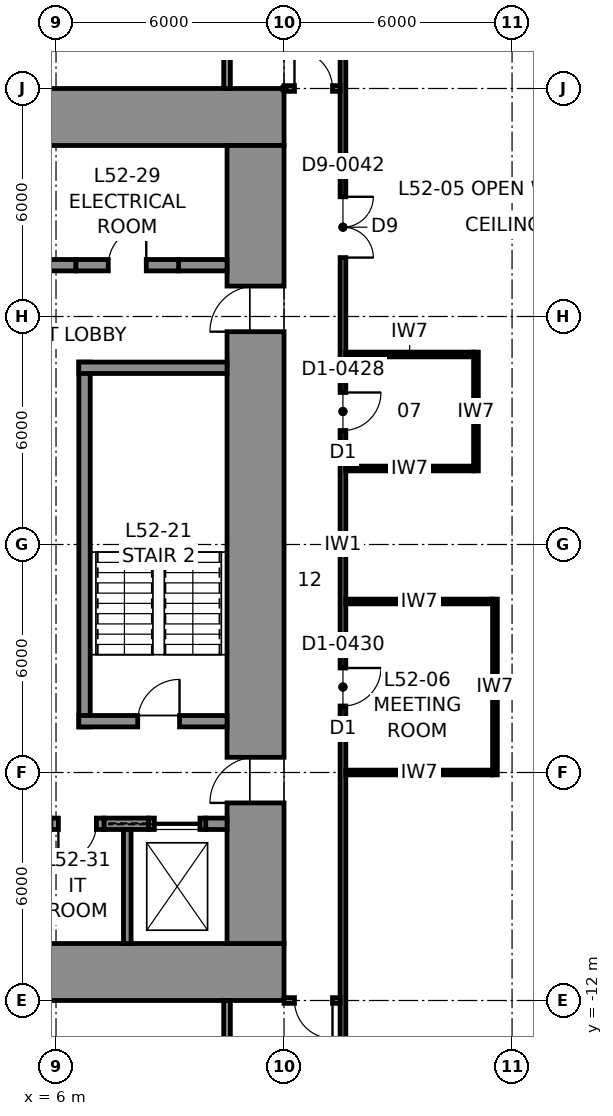
"""IFC4 building model, lengths in metres.
Left out: names, types, materials, properties, quantities, classifications, styles, units other than length and angle.
Written with IfcOpenShell. Run it as: python <this file> out.ifc"""

import sys

from ifc_helpers import new_model, si_unit, direction, frame, frame_2d, origin, place, context, subcontext, project, spatial, rectangle, extrude, element, fill, save


model = new_model("IFC4")
c1 = context("Model", 3, precision=1e-05, world=origin(), true_north=direction((0.0, 1.0)))
c2 = subcontext(c1, "Body", "Model", "MODEL_VIEW")
j1 = project(units=[si_unit("LENGTHUNIT", "METRE"), si_unit("PLANEANGLEUNIT", "RADIAN")], contexts=[c1])
p1 = place(None, origin())
s1 = spatial("IfcSite", under=j1, at=p1, CompositionType="ELEMENT")
p2 = place(p1, origin())
s2 = spatial("IfcBuilding", under=s1, at=p2, CompositionType="ELEMENT")
p3 = place(p2, frame((0.0, 0.0, 237.8)))
s3 = spatial("IfcBuildingStorey", under=s2, at=p3, CompositionType="ELEMENT", Elevation=237.8)
for number, where, z_axis, x_axis in (
    (1, (-12.0, 11.25, 0.0), (0.0, 0.0, 1.0), (1.0, 0.0, 0.0)),
    (2, (12.0, -11.25, 0.0), (0.0, 0.0, 1.0), (-1.0, 0.0, 0.0)),
):
    element("IfcWall", number, at=place(p3, frame(where, z_axis=z_axis, x_axis=x_axis)), inside=s3, PredefinedType="SHEAR", context=c2, shape_type="SweptSolid", body=[
        extrude(rectangle(XDim=24.0, YDim=1.5, at=frame_2d((12.0, 0.0))), origin(), (0.0, 0.0, 1.0), 4.0),
    ])
p4 = place(p3, frame((11.25, 10.5, 0.0), z_axis=(0.0, 0.0, 1.0), x_axis=(0.0, -1.0, 0.0)))
e3 = element("IfcWall", 3, at=p4, inside=s3, PredefinedType="SHEAR", context=c2, shape_type="SweptSolid", body=[
    extrude(rectangle(XDim=21.0, YDim=1.5, at=frame_2d((10.5, 0.0))), origin(), (0.0, 0.0, 1.0), 4.0),
])
p5 = place(p4, frame((3.7, 0.0, 0.0)))
e4 = element("IfcOpeningElement", 4, at=p5, cuts=e3, PredefinedType="OPENING", context=c2, shape_type="SweptSolid", body=[
    extrude(rectangle(XDim=1.2, YDim=2.3, at=frame_2d((0.6, 1.15))), frame((0.0, 0.76, 0.0), z_axis=(0.0, -1.0, 0.0), x_axis=(1.0, 0.0, 0.0)), (0.0, 0.0, 1.0), 1.52),
])
p6 = place(p4, frame((16.1, 0.0, 0.0)))
e5 = element("IfcOpeningElement", 5, at=p6, cuts=e3, PredefinedType="OPENING", context=c2, shape_type="SweptSolid", body=[
    extrude(rectangle(XDim=1.2, YDim=2.3, at=frame_2d((0.6, 1.15))), frame((0.0, 0.76, 0.0), z_axis=(0.0, -1.0, 0.0), x_axis=(1.0, 0.0, 0.0)), (0.0, 0.0, 1.0), 1.52),
])
p7 = place(p3, frame((4.637, 7.35, 0.0), z_axis=(0.0, 0.0, 1.0), x_axis=(1.0, 0.0, 0.0)))
e6 = element("IfcWall", 6, at=p7, inside=s3, PredefinedType="SHEAR", context=c2, shape_type="SweptSolid", body=[
    extrude(rectangle(XDim=1.887, YDim=0.3, at=frame_2d((0.944, 0.0))), origin(), (0.0, 0.0, 1.0), 4.0),
])
p8 = place(p3, frame((9.225, 7.35, 0.0), z_axis=(0.0, 0.0, 1.0), x_axis=(1.0, 0.0, 0.0)))
e7 = element("IfcWall", 7, at=p8, inside=s3, PredefinedType="SHEAR", context=c2, shape_type="SweptSolid", body=[
    extrude(rectangle(XDim=1.275, YDim=0.3, at=frame_2d((0.637, 0.0))), origin(), (0.0, 0.0, 1.0), 4.0),
])
p9 = place(p3, frame((6.525, 7.35, 0.0), z_axis=(0.0, 0.0, 1.0), x_axis=(1.0, 0.0, 0.0)))
e8 = element("IfcWall", 8, at=p9, inside=s3, PredefinedType="PARTITIONING", context=c2, shape_type="SweptSolid", body=[
    extrude(rectangle(XDim=2.7, YDim=0.3, at=frame_2d((1.35, 0.0))), origin(), (0.0, 0.0, 1.0), 4.0),
])
p10 = place(p9, frame((0.85, 0.0, 0.0)))
e9 = element("IfcOpeningElement", 9, at=p10, cuts=e8, PredefinedType="OPENING", context=c2, shape_type="SweptSolid", body=[
    extrude(rectangle(XDim=1.0, YDim=2.3, at=frame_2d((0.5, 1.15))), frame((0.0, 0.16, 0.0), z_axis=(0.0, -1.0, 0.0), x_axis=(1.0, 0.0, 0.0)), (0.0, 0.0, 1.0), 0.32),
])
p11 = place(p3, frame((7.262, -7.35, 0.0), z_axis=(0.0, 0.0, 1.0), x_axis=(1.0, 0.0, 0.0)))
e10 = element("IfcWall", 10, at=p11, inside=s3, PredefinedType="SHEAR", context=c2, shape_type="SweptSolid", body=[
    extrude(rectangle(XDim=1.175, YDim=0.3, at=frame_2d((0.587, 0.0))), origin(), (0.0, 0.0, 1.0), 4.0),
])
p12 = place(p3, frame((9.938, -7.35, 0.0), z_axis=(0.0, 0.0, 1.0), x_axis=(1.0, 0.0, 0.0)))
e11 = element("IfcWall", 11, at=p12, inside=s3, PredefinedType="SHEAR", context=c2, shape_type="SweptSolid", body=[
    extrude(rectangle(XDim=0.562, YDim=0.3, at=frame_2d((0.281, 0.0))), origin(), (0.0, 0.0, 1.0), 4.0),
])
p13 = place(p3, frame((5.863, -7.35, 0.0), z_axis=(0.0, 0.0, 1.0), x_axis=(1.0, 0.0, 0.0)))
e12 = element("IfcWall", 12, at=p13, inside=s3, PredefinedType="PARTITIONING", context=c2, shape_type="SweptSolid", body=[
    extrude(rectangle(XDim=1.4, YDim=0.3, at=frame_2d((0.7, 0.0))), origin(), (0.0, 0.0, 1.0), 4.0),
])
p14 = place(p13, frame((0.2, 0.0, 0.0)))
e13 = element("IfcOpeningElement", 13, at=p14, cuts=e12, PredefinedType="OPENING", context=c2, shape_type="SweptSolid", body=[
    extrude(rectangle(XDim=1.0, YDim=2.3, at=frame_2d((0.5, 1.15))), frame((0.0, 0.16, 0.0), z_axis=(0.0, -1.0, 0.0), x_axis=(1.0, 0.0, 0.0)), (0.0, 0.0, 1.0), 0.32),
])
p15 = place(p3, frame((8.438, -7.35, 0.0), z_axis=(0.0, 0.0, 1.0), x_axis=(1.0, 0.0, 0.0)))
e14 = element("IfcWall", 14, at=p15, inside=s3, PredefinedType="PARTITIONING", context=c2, shape_type="SweptSolid", body=[
    extrude(rectangle(XDim=1.5, YDim=0.3, at=frame_2d((0.75, 0.0))), origin(), (0.0, 0.0, 1.0), 4.0),
])
p16 = place(p15, frame((0.15, 0.0, 0.0)))
e15 = element("IfcOpeningElement", 15, at=p16, cuts=e14, PredefinedType="OPENING", context=c2, shape_type="SweptSolid", body=[
    extrude(rectangle(XDim=1.2, YDim=2.3, at=frame_2d((0.6, 1.15))), frame((0.0, 0.16, 0.0), z_axis=(0.0, -1.0, 0.0), x_axis=(1.0, 0.0, 0.0)), (0.0, 0.0, 1.0), 0.32),
])
p17 = place(p3, frame((7.875, -10.5, 0.0), z_axis=(0.0, 0.0, 1.0), x_axis=(0.0, 1.0, 0.0)))
e16 = element("IfcWall", 16, at=p17, inside=s3, PredefinedType="PARTITIONING", context=c2, shape_type="SweptSolid", body=[
    extrude(rectangle(XDim=3.0, YDim=0.2, at=frame_2d((1.5, 0.0))), origin(), (0.0, 0.0, 1.0), 4.0),
])
p18 = place(p3, frame((13.55, -13.575, 0.0), z_axis=(0.0, 0.0, 1.0), x_axis=(0.0, 1.0, 0.0)))
e17 = element("IfcWall", 17, at=p18, inside=s3, PredefinedType="PARTITIONING", context=c2, shape_type="SweptSolid", body=[
    extrude(rectangle(XDim=27.15, YDim=0.15, at=frame_2d((13.575, 0.0))), origin(), (0.0, 0.0, 1.0), 3.83),
])
p19 = place(p18, frame((21.125, 0.0, 0.0)))
e18 = element("IfcOpeningElement", 18, at=p19, cuts=e17, PredefinedType="OPENING", context=c2, shape_type="SweptSolid", body=[
    extrude(rectangle(XDim=1.6, YDim=2.3, at=frame_2d((0.8, 1.15))), frame((0.0, 0.085, 0.0), z_axis=(0.0, -1.0, 0.0), x_axis=(1.0, 0.0, 0.0)), (0.0, 0.0, 1.0), 0.17),
])
p20 = place(p18, frame((9.325, 0.0, 0.0)))
e19 = element("IfcOpeningElement", 19, at=p20, cuts=e17, PredefinedType="OPENING", context=c2, shape_type="SweptSolid", body=[
    extrude(rectangle(XDim=1.0, YDim=2.3, at=frame_2d((0.5, 1.15))), frame((0.0, 0.085, 0.0), z_axis=(0.0, -1.0, 0.0), x_axis=(1.0, 0.0, 0.0)), (0.0, 0.0, 1.0), 0.17),
])
p21 = place(p18, frame((16.575, 0.0, 0.0)))
e20 = element("IfcOpeningElement", 20, at=p21, cuts=e17, PredefinedType="OPENING", context=c2, shape_type="SweptSolid", body=[
    extrude(rectangle(XDim=1.0, YDim=2.3, at=frame_2d((0.5, 1.15))), frame((0.0, 0.085, 0.0), z_axis=(0.0, -1.0, 0.0), x_axis=(1.0, 0.0, 0.0)), (0.0, 0.0, 1.0), 0.17),
])
p22 = place(p3, frame((12.0, 12.0, 0.0), z_axis=(0.0, 0.0, 1.0), x_axis=(1.0, 0.0, 0.0)))
e21 = element("IfcWall", 21, at=p22, inside=s3, PredefinedType="PARTITIONING", context=c2, shape_type="SweptSolid", body=[
    extrude(rectangle(XDim=1.475, YDim=0.15, at=frame_2d((0.738, 0.0))), origin(), (0.0, 0.0, 1.0), 3.83),
])
p23 = place(p22, frame((0.275, 0.0, 0.0)))
e22 = element("IfcOpeningElement", 22, at=p23, cuts=e21, PredefinedType="OPENING", context=c2, shape_type="SweptSolid", body=[
    extrude(rectangle(XDim=1.0, YDim=2.3, at=frame_2d((0.5, 1.15))), frame((0.0, 0.085, 0.0), z_axis=(0.0, -1.0, 0.0), x_axis=(1.0, 0.0, 0.0)), (0.0, 0.0, 1.0), 0.17),
])
p24 = place(p3, frame((13.475, -12.0, 0.0), z_axis=(0.0, 0.0, 1.0), x_axis=(-1.0, 0.0, 0.0)))
e23 = element("IfcWall", 23, at=p24, inside=s3, PredefinedType="PARTITIONING", context=c2, shape_type="SweptSolid", body=[
    extrude(rectangle(XDim=1.475, YDim=0.15, at=frame_2d((0.738, 0.0))), origin(), (0.0, 0.0, 1.0), 3.83),
])
p25 = place(p24, frame((0.2, 0.0, 0.0)))
e24 = element("IfcOpeningElement", 24, at=p25, cuts=e23, PredefinedType="OPENING", context=c2, shape_type="SweptSolid", body=[
    extrude(rectangle(XDim=1.0, YDim=2.3, at=frame_2d((0.5, 1.15))), frame((0.0, 0.085, 0.0), z_axis=(0.0, -1.0, 0.0), x_axis=(1.0, 0.0, 0.0)), (0.0, 0.0, 1.0), 0.17),
])
for number, where, z_axis, x_axis in (
    (25, (10.5, 12.0, 0.0), (0.0, 0.0, 1.0), (0.0, 1.0, 0.0)),
    (26, (10.5, -12.0, 0.0), (0.0, 0.0, 1.0), (0.0, -1.0, 0.0)),
):
    element("IfcWall", number, at=place(p3, frame(where, z_axis=z_axis, x_axis=x_axis)), inside=s3, PredefinedType="PARTITIONING", context=c2, shape_type="SweptSolid", body=[
        extrude(rectangle(XDim=10.75, YDim=0.175, at=frame_2d((5.375, 0.0))), origin(), (0.0, 0.0, 1.0), 3.83),
    ])
p26 = place(p3, frame((17.55, -6.062, 0.0), z_axis=(0.0, 0.0, 1.0), x_axis=(0.0, 1.0, 0.0)))
e27 = element("IfcWall", 27, at=p26, inside=s3, PredefinedType="PARTITIONING", context=c2, shape_type="SweptSolid", body=[
    extrude(rectangle(XDim=4.625, YDim=0.125, at=frame_2d((2.312, 0.0))), origin(), (0.0, 0.0, 1.0), 3.83),
])
for number, where, z_axis, x_axis in (
    (28, (13.625, -6.0, 0.0), (0.0, 0.0, 1.0), (1.0, 0.0, 0.0)),
    (29, (13.625, -1.5, 0.0), (0.0, 0.0, 1.0), (1.0, 0.0, 0.0)),
):
    element("IfcWall", number, at=place(p3, frame(where, z_axis=z_axis, x_axis=x_axis)), inside=s3, PredefinedType="PARTITIONING", context=c2, shape_type="SweptSolid", body=[
        extrude(rectangle(XDim=3.863, YDim=0.125, at=frame_2d((1.931, 0.0))), origin(), (0.0, 0.0, 1.0), 3.83),
    ])
p27 = place(p3, frame((17.05, 1.938, 0.0), z_axis=(0.0, 0.0, 1.0), x_axis=(0.0, 1.0, 0.0)))
e30 = element("IfcWall", 30, at=p27, inside=s3, PredefinedType="PARTITIONING", context=c2, shape_type="SweptSolid", body=[
    extrude(rectangle(XDim=3.125, YDim=0.125, at=frame_2d((1.562, 0.0))), origin(), (0.0, 0.0, 1.0), 3.83),
])
for number, where, z_axis, x_axis in (
    (31, (13.625, 2.0, 0.0), (0.0, 0.0, 1.0), (1.0, 0.0, 0.0)),
    (32, (13.625, 5.0, 0.0), (0.0, 0.0, 1.0), (1.0, 0.0, 0.0)),
):
    element("IfcWall", number, at=place(p3, frame(where, z_axis=z_axis, x_axis=x_axis)), inside=s3, PredefinedType="PARTITIONING", context=c2, shape_type="SweptSolid", body=[
        extrude(rectangle(XDim=3.363, YDim=0.125, at=frame_2d((1.681, 0.0))), origin(), (0.0, 0.0, 1.0), 3.83),
    ])
p28 = place(p3, frame((6.75, -4.8, 0.0), z_axis=(0.0, 0.0, 1.0), x_axis=(0.0, 1.0, 0.0)))
e33 = element("IfcWall", 33, at=p28, inside=s3, PredefinedType="SOLIDWALL", context=c2, shape_type="SweptSolid", body=[
    extrude(rectangle(XDim=9.6, YDim=0.3, at=frame_2d((4.8, 0.0))), origin(), (0.0, 0.0, 1.0), 3.75),
])
p29 = place(p3, frame((6.6, 4.65, 0.0), z_axis=(0.0, 0.0, 1.0), x_axis=(1.0, 0.0, 0.0)))
e34 = element("IfcWall", 34, at=p29, inside=s3, PredefinedType="SOLIDWALL", context=c2, shape_type="SweptSolid", body=[
    extrude(rectangle(XDim=3.9, YDim=0.3, at=frame_2d((1.95, 0.0))), origin(), (0.0, 0.0, 1.0), 3.75),
])
p30 = place(p3, frame((10.5, -4.65, 0.0), z_axis=(0.0, 0.0, 1.0), x_axis=(-1.0, 0.0, 0.0)))
e35 = element("IfcWall", 35, at=p30, inside=s3, PredefinedType="SOLIDWALL", context=c2, shape_type="SweptSolid", body=[
    extrude(rectangle(XDim=3.9, YDim=0.3, at=frame_2d((1.95, 0.0))), origin(), (0.0, 0.0, 1.0), 3.75),
])
p31 = place(p30, frame((1.25, 0.0, 0.0)))
e36 = element("IfcOpeningElement", 36, at=p31, cuts=e35, PredefinedType="OPENING", context=c2, shape_type="SweptSolid", body=[
    extrude(rectangle(XDim=1.1, YDim=2.3, at=frame_2d((0.55, 1.15))), frame((0.0, 0.16, 0.0), z_axis=(0.0, -1.0, 0.0), x_axis=(1.0, 0.0, 0.0)), (0.0, 0.0, 1.0), 0.32),
])
p32 = place(p23, origin())
e37 = element("IfcDoor", 37, at=p32, inside=s3, OperationType="SINGLE_SWING_LEFT", PredefinedType="DOOR", context=c2, shape_type="SweptSolid", body=[
    extrude(rectangle(XDim=1.0, YDim=2.3, at=frame_2d((0.5, 1.15))), frame((0.0, 0.025, 0.0), z_axis=(0.0, -1.0, 0.0), x_axis=(1.0, 0.0, 0.0)), (0.0, 0.0, 1.0), 0.05),
])
fill(e22, e37)
p33 = place(p25, origin())
e38 = element("IfcDoor", 38, at=p33, inside=s3, OperationType="SINGLE_SWING_LEFT", PredefinedType="DOOR", context=c2, shape_type="SweptSolid", body=[
    extrude(rectangle(XDim=1.0, YDim=2.3, at=frame_2d((0.5, 1.15))), frame((0.0, 0.025, 0.0), z_axis=(0.0, -1.0, 0.0), x_axis=(1.0, 0.0, 0.0)), (0.0, 0.0, 1.0), 0.05),
])
fill(e24, e38)
p34 = place(p19, frame((1.6, 0.0, 0.0), z_axis=(0.0, 0.0, 1.0), x_axis=(-1.0, 0.0, 0.0)))
e39 = element("IfcDoor", 39, at=p34, inside=s3, OperationType="DOUBLE_DOOR_SINGLE_SWING", PredefinedType="DOOR", context=c2, shape_type="SweptSolid", body=[
    extrude(rectangle(XDim=1.6, YDim=2.3, at=frame_2d((0.8, 1.15))), frame((0.0, 0.025, 0.0), z_axis=(0.0, -1.0, 0.0), x_axis=(1.0, 0.0, 0.0)), (0.0, 0.0, 1.0), 0.05),
])
fill(e18, e39)
p35 = place(p20, frame((1.0, 0.0, 0.0), z_axis=(0.0, 0.0, 1.0), x_axis=(-1.0, 0.0, 0.0)))
e40 = element("IfcDoor", 40, at=p35, inside=s3, OperationType="SINGLE_SWING_LEFT", PredefinedType="DOOR", context=c2, shape_type="SweptSolid", body=[
    extrude(rectangle(XDim=1.0, YDim=2.3, at=frame_2d((0.5, 1.15))), frame((0.0, 0.025, 0.0), z_axis=(0.0, -1.0, 0.0), x_axis=(1.0, 0.0, 0.0)), (0.0, 0.0, 1.0), 0.05),
])
fill(e19, e40)
p36 = place(p21, frame((1.0, 0.0, 0.0), z_axis=(0.0, 0.0, 1.0), x_axis=(-1.0, 0.0, 0.0)))
e41 = element("IfcDoor", 41, at=p36, inside=s3, OperationType="SINGLE_SWING_LEFT", PredefinedType="DOOR", context=c2, shape_type="SweptSolid", body=[
    extrude(rectangle(XDim=1.0, YDim=2.3, at=frame_2d((0.5, 1.15))), frame((0.0, 0.025, 0.0), z_axis=(0.0, -1.0, 0.0), x_axis=(1.0, 0.0, 0.0)), (0.0, 0.0, 1.0), 0.05),
])
fill(e20, e41)
p37 = place(p31, frame((1.1, 0.0, 0.0), z_axis=(0.0, 0.0, 1.0), x_axis=(-1.0, 0.0, 0.0)))
e42 = element("IfcDoor", 42, at=p37, inside=s3, OperationType="SINGLE_SWING_RIGHT", PredefinedType="DOOR", context=c2, shape_type="SweptSolid", body=[
    extrude(rectangle(XDim=1.1, YDim=2.3, at=frame_2d((0.55, 1.15))), frame((0.0, 0.025, 0.0), z_axis=(0.0, -1.0, 0.0), x_axis=(1.0, 0.0, 0.0)), (0.0, 0.0, 1.0), 0.05),
])
fill(e36, e42)
p38 = place(p10, origin())
e43 = element("IfcDoor", 43, at=p38, inside=s3, OperationType="SINGLE_SWING_RIGHT", PredefinedType="DOOR", context=c2, shape_type="SweptSolid", body=[
    extrude(rectangle(XDim=1.0, YDim=2.3, at=frame_2d((0.5, 1.15))), frame((0.0, 0.025, 0.0), z_axis=(0.0, -1.0, 0.0), x_axis=(1.0, 0.0, 0.0)), (0.0, 0.0, 1.0), 0.05),
])
fill(e9, e43)
p39 = place(p14, frame((1.0, 0.0, 0.0), z_axis=(0.0, 0.0, 1.0), x_axis=(-1.0, 0.0, 0.0)))
e44 = element("IfcDoor", 44, at=p39, inside=s3, OperationType="SINGLE_SWING_RIGHT", PredefinedType="DOOR", context=c2, shape_type="SweptSolid", body=[
    extrude(rectangle(XDim=1.0, YDim=2.3, at=frame_2d((0.5, 1.15))), frame((0.0, 0.025, 0.0), z_axis=(0.0, -1.0, 0.0), x_axis=(1.0, 0.0, 0.0)), (0.0, 0.0, 1.0), 0.05),
])
fill(e13, e44)
p40 = place(p5, frame((1.2, 0.0, 0.0), z_axis=(0.0, 0.0, 1.0), x_axis=(-1.0, 0.0, 0.0)))
e45 = element("IfcDoor", 45, at=p40, inside=s3, OperationType="SINGLE_SWING_LEFT", PredefinedType="DOOR", context=c2, shape_type="SweptSolid", body=[
    extrude(rectangle(XDim=1.2, YDim=2.3, at=frame_2d((0.6, 1.15))), frame((0.0, 0.025, 0.0), z_axis=(0.0, -1.0, 0.0), x_axis=(1.0, 0.0, 0.0)), (0.0, 0.0, 1.0), 0.05),
])
fill(e4, e45)
p41 = place(p6, frame((1.2, 0.0, 0.0), z_axis=(0.0, 0.0, 1.0), x_axis=(-1.0, 0.0, 0.0)))
e46 = element("IfcDoor", 46, at=p41, inside=s3, OperationType="SINGLE_SWING_LEFT", PredefinedType="DOOR", context=c2, shape_type="SweptSolid", body=[
    extrude(rectangle(XDim=1.2, YDim=2.3, at=frame_2d((0.6, 1.15))), frame((0.0, 0.025, 0.0), z_axis=(0.0, -1.0, 0.0), x_axis=(1.0, 0.0, 0.0)), (0.0, 0.0, 1.0), 0.05),
])
fill(e5, e46)
p42 = place(p16, origin())
e47 = element("IfcDoor", 47, at=p42, inside=s3, OperationType="SLIDING_TO_LEFT", PredefinedType="DOOR", context=c2, shape_type="SweptSolid", body=[
    extrude(rectangle(XDim=1.2, YDim=2.3, at=frame_2d((0.6, 1.15))), frame((0.0, 0.025, 0.0), z_axis=(0.0, -1.0, 0.0), x_axis=(1.0, 0.0, 0.0)), (0.0, 0.0, 1.0), 0.05),
])
fill(e15, e47)
save(model, sys.argv[1])
